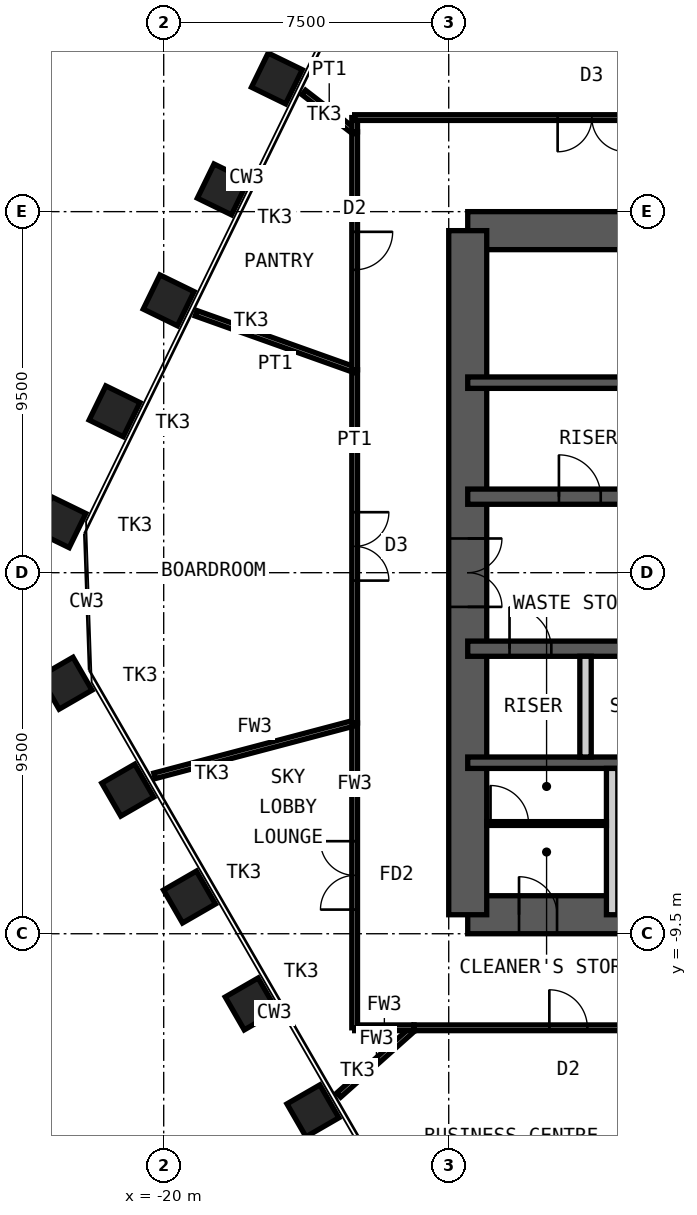
"""IFC4 building model, lengths in metres.
Left out: names, types, materials, properties, quantities, classifications, styles, units other than length and angle.
Written with IfcOpenShell. Run it as: python <this file> out.ifc"""

import sys

from ifc_helpers import new_model, si_unit, direction, frame, frame_2d, origin, origin_2d, place, context, subcontext, project, spatial, rectangle, hollow_rectangle, extrude, element, fill, save


model = new_model("IFC4")
c1 = context("Model", 3, precision=1e-05, world=origin(), true_north=direction((0.0, 1.0)))
c2 = subcontext(c1, "Body", "Model", "MODEL_VIEW")
j1 = project(units=[si_unit("LENGTHUNIT", "METRE"), si_unit("PLANEANGLEUNIT", "RADIAN")], contexts=[c1])
p1 = place(None, origin())
s1 = spatial("IfcSite", under=j1, at=p1, CompositionType="ELEMENT")
p2 = place(p1, origin())
s2 = spatial("IfcBuilding", under=s1, at=p2, CompositionType="ELEMENT")
p3 = place(p2, frame((0.0, 0.0, 262.0)))
s3 = spatial("IfcBuildingStorey", under=s2, at=p3, CompositionType="ELEMENT", Elevation=262.0)
for number, where, z_axis, x_axis in (
    (1, (-16.073, -14.16, 0.0), (0.0, 0.0, 1.0), (0.5, -0.866, 0.0)),
    (2, (-17.698, -11.347, 0.0), (0.0, 0.0, 1.0), (0.5, -0.866, 0.0)),
    (3, (-19.322, -8.534, 0.0), (0.0, 0.0, 1.0), (0.5, -0.866, 0.0)),
    (4, (-20.946, -5.721, 0.0), (0.0, 0.0, 1.0), (0.5, -0.866, 0.0)),
    (5, (-22.57, -2.908, 0.0), (0.0, 0.0, 1.0), (0.5, -0.866, 0.0)),
    (6, (-22.717, 1.327, 0.0), (0.0, 0.0, 1.0), (-0.438, -0.899, 0.0)),
    (7, (-21.293, 4.246, 0.0), (0.0, 0.0, 1.0), (-0.438, -0.899, 0.0)),
    (8, (-19.87, 7.166, 0.0), (0.0, 0.0, 1.0), (-0.438, -0.899, 0.0)),
    (9, (-18.446, 10.085, 0.0), (0.0, 0.0, 1.0), (-0.438, -0.899, 0.0)),
    (10, (-17.022, 13.004, 0.0), (0.0, 0.0, 1.0), (-0.438, -0.899, 0.0)),
):
    element("IfcColumn", number, at=place(p3, frame(where, z_axis=z_axis, x_axis=x_axis)), inside=s3, PredefinedType="COLUMN", context=c2, shape_type="SweptSolid", body=[
        extrude(hollow_rectangle(XDim=1.0, YDim=1.0, WallThickness=0.08, at=origin_2d()), origin(), (0.0, 0.0, 1.0), 4.2),
    ])
p4 = place(p3, frame((-12.0, 9.0, 0.0), z_axis=(0.0, 0.0, 1.0), x_axis=(1.0, 0.0, 0.0)))
e11 = element("IfcWall", 11, at=p4, inside=s3, PredefinedType="SHEAR", context=c2, shape_type="SweptSolid", body=[
    extrude(rectangle(XDim=24.0, YDim=1.0, at=frame_2d((12.0, 0.0))), origin(), (0.0, 0.0, 1.0), 4.2),
])
p5 = place(p4, frame((10.4, 0.0, 0.0)))
e12 = element("IfcOpeningElement", 12, at=p5, cuts=e11, PredefinedType="OPENING", context=c2, shape_type="SweptSolid", body=[
    extrude(rectangle(XDim=1.0, YDim=2.1, at=frame_2d((0.5, 1.05))), frame((0.0, 0.51, 0.0), z_axis=(0.0, -1.0, 0.0), x_axis=(1.0, 0.0, 0.0)), (0.0, 0.0, 1.0), 1.02),
])
p6 = place(p4, frame((17.6, 0.0, 0.0)))
e13 = element("IfcOpeningElement", 13, at=p6, cuts=e11, PredefinedType="OPENING", context=c2, shape_type="SweptSolid", body=[
    extrude(rectangle(XDim=0.9, YDim=2.1, at=frame_2d((0.45, 1.05))), frame((0.0, 0.51, 0.0), z_axis=(0.0, -1.0, 0.0), x_axis=(1.0, 0.0, 0.0)), (0.0, 0.0, 1.0), 1.02),
])
p7 = place(p4, frame((21.9, 0.0, 0.0)))
e14 = element("IfcOpeningElement", 14, at=p7, cuts=e11, PredefinedType="OPENING", context=c2, shape_type="SweptSolid", body=[
    extrude(rectangle(XDim=0.9, YDim=2.1, at=frame_2d((0.45, 1.05))), frame((0.0, 0.51, 0.0), z_axis=(0.0, -1.0, 0.0), x_axis=(1.0, 0.0, 0.0)), (0.0, 0.0, 1.0), 1.02),
])
p8 = place(p3, frame((-12.0, -9.0, 0.0), z_axis=(0.0, 0.0, 1.0), x_axis=(1.0, 0.0, 0.0)))
e15 = element("IfcWall", 15, at=p8, inside=s3, PredefinedType="SHEAR", context=c2, shape_type="SweptSolid", body=[
    extrude(rectangle(XDim=24.0, YDim=1.0, at=frame_2d((12.0, 0.0))), origin(), (0.0, 0.0, 1.0), 4.2),
])
p9 = place(p8, frame((1.35, 0.0, 0.0)))
e16 = element("IfcOpeningElement", 16, at=p9, cuts=e15, PredefinedType="OPENING", context=c2, shape_type="SweptSolid", body=[
    extrude(rectangle(XDim=1.0, YDim=2.1, at=frame_2d((0.5, 1.05))), frame((0.0, 0.51, 0.0), z_axis=(0.0, -1.0, 0.0), x_axis=(1.0, 0.0, 0.0)), (0.0, 0.0, 1.0), 1.02),
])
p10 = place(p8, frame((5.325, 0.0, 0.0)))
e17 = element("IfcOpeningElement", 17, at=p10, cuts=e15, PredefinedType="OPENING", context=c2, shape_type="SweptSolid", body=[
    extrude(rectangle(XDim=1.15, YDim=2.1, at=frame_2d((0.575, 1.05))), frame((0.0, 0.51, 0.0), z_axis=(0.0, -1.0, 0.0), x_axis=(1.0, 0.0, 0.0)), (0.0, 0.0, 1.0), 1.02),
])
p11 = place(p8, frame((12.6, 0.0, 0.0)))
e18 = element("IfcOpeningElement", 18, at=p11, cuts=e15, PredefinedType="OPENING", context=c2, shape_type="SweptSolid", body=[
    extrude(rectangle(XDim=1.0, YDim=2.1, at=frame_2d((0.5, 1.05))), frame((0.0, 0.51, 0.0), z_axis=(0.0, -1.0, 0.0), x_axis=(1.0, 0.0, 0.0)), (0.0, 0.0, 1.0), 1.02),
])
p12 = place(p3, frame((-12.0, -9.0, 0.0), z_axis=(0.0, 0.0, 1.0), x_axis=(0.0, 1.0, 0.0)))
e19 = element("IfcWall", 19, at=p12, inside=s3, PredefinedType="SHEAR", context=c2, shape_type="SweptSolid", body=[
    extrude(rectangle(XDim=18.0, YDim=1.0, at=frame_2d((9.0, 0.0))), origin(), (0.0, 0.0, 1.0), 4.2),
])
p13 = place(p12, frame((8.1, 0.0, 0.0)))
e20 = element("IfcOpeningElement", 20, at=p13, cuts=e19, PredefinedType="OPENING", context=c2, shape_type="SweptSolid", body=[
    extrude(rectangle(XDim=1.8, YDim=2.1, at=frame_2d((0.9, 1.05))), frame((0.0, 0.51, 0.0), z_axis=(0.0, -1.0, 0.0), x_axis=(1.0, 0.0, 0.0)), (0.0, 0.0, 1.0), 1.02),
])
p14 = place(p3, frame((-12.0, 5.0, 0.0), z_axis=(0.0, 0.0, 1.0), x_axis=(1.0, 0.0, 0.0)))
e21 = element("IfcWall", 21, at=p14, inside=s3, PredefinedType="SHEAR", context=c2, shape_type="SweptSolid", body=[
    extrude(rectangle(XDim=24.0, YDim=0.3, at=frame_2d((12.0, 0.0))), origin(), (0.0, 0.0, 1.0), 4.2),
])
p15 = place(p3, frame((-12.0, 2.0, 0.0), z_axis=(0.0, 0.0, 1.0), x_axis=(1.0, 0.0, 0.0)))
e22 = element("IfcWall", 22, at=p15, inside=s3, PredefinedType="SHEAR", context=c2, shape_type="SweptSolid", body=[
    extrude(rectangle(XDim=24.0, YDim=0.4, at=frame_2d((12.0, 0.0))), origin(), (0.0, 0.0, 1.0), 4.2),
])
p16 = place(p15, frame((2.4, 0.0, 0.0)))
e23 = element("IfcOpeningElement", 23, at=p16, cuts=e22, PredefinedType="OPENING", context=c2, shape_type="SweptSolid", body=[
    extrude(rectangle(XDim=1.1, YDim=2.1, at=frame_2d((0.55, 1.05))), frame((0.0, 0.21, 0.0), z_axis=(0.0, -1.0, 0.0), x_axis=(1.0, 0.0, 0.0)), (0.0, 0.0, 1.0), 0.42),
])
p17 = place(p15, frame((22.0, 0.0, 0.0)))
e24 = element("IfcOpeningElement", 24, at=p17, cuts=e22, PredefinedType="OPENING", context=c2, shape_type="SweptSolid", body=[
    extrude(rectangle(XDim=1.1, YDim=2.1, at=frame_2d((0.55, 1.05))), frame((0.0, 0.21, 0.0), z_axis=(0.0, -1.0, 0.0), x_axis=(1.0, 0.0, 0.0)), (0.0, 0.0, 1.0), 0.42),
])
p18 = place(p15, frame((10.15, 0.0, 0.0)))
e25 = element("IfcOpeningElement", 25, at=p18, cuts=e22, PredefinedType="OPENING", context=c2, shape_type="SweptSolid", body=[
    extrude(rectangle(XDim=1.0, YDim=2.1, at=frame_2d((0.5, 1.05))), frame((0.0, 0.21, 0.0), z_axis=(0.0, -1.0, 0.0), x_axis=(1.0, 0.0, 0.0)), (0.0, 0.0, 1.0), 0.42),
])
p19 = place(p15, frame((6.9, 0.0, 0.0)))
e26 = element("IfcOpeningElement", 26, at=p19, cuts=e22, PredefinedType="OPENING", context=c2, shape_type="SweptSolid", body=[
    extrude(rectangle(XDim=1.0, YDim=2.1, at=frame_2d((0.5, 1.05))), frame((0.0, 0.21, 0.0), z_axis=(0.0, -1.0, 0.0), x_axis=(1.0, 0.0, 0.0)), (0.0, 0.0, 1.0), 0.42),
])
p20 = place(p15, frame((13.35, 0.0, 0.0)))
e27 = element("IfcOpeningElement", 27, at=p20, cuts=e22, PredefinedType="OPENING", context=c2, shape_type="SweptSolid", body=[
    extrude(rectangle(XDim=1.1, YDim=2.4, at=frame_2d((0.55, 1.2))), frame((0.0, 0.21, 0.0), z_axis=(0.0, -1.0, 0.0), x_axis=(1.0, 0.0, 0.0)), (0.0, 0.0, 1.0), 0.42),
])
p21 = place(p15, frame((16.15, 0.0, 0.0)))
e28 = element("IfcOpeningElement", 28, at=p21, cuts=e22, PredefinedType="OPENING", context=c2, shape_type="SweptSolid", body=[
    extrude(rectangle(XDim=1.1, YDim=2.4, at=frame_2d((0.55, 1.2))), frame((0.0, 0.21, 0.0), z_axis=(0.0, -1.0, 0.0), x_axis=(1.0, 0.0, 0.0)), (0.0, 0.0, 1.0), 0.42),
])
p22 = place(p15, frame((19.0, 0.0, 0.0)))
e29 = element("IfcOpeningElement", 29, at=p22, cuts=e22, PredefinedType="OPENING", context=c2, shape_type="SweptSolid", body=[
    extrude(rectangle(XDim=1.0, YDim=2.1, at=frame_2d((0.5, 1.05))), frame((0.0, 0.21, 0.0), z_axis=(0.0, -1.0, 0.0), x_axis=(1.0, 0.0, 0.0)), (0.0, 0.0, 1.0), 0.42),
])
p23 = place(p3, frame((-12.0, -2.0, 0.0), z_axis=(0.0, 0.0, 1.0), x_axis=(1.0, 0.0, 0.0)))
e30 = element("IfcWall", 30, at=p23, inside=s3, PredefinedType="SHEAR", context=c2, shape_type="SweptSolid", body=[
    extrude(rectangle(XDim=24.0, YDim=0.4, at=frame_2d((12.0, 0.0))), origin(), (0.0, 0.0, 1.0), 4.2),
])
p24 = place(p23, frame((1.1, 0.0, 0.0)))
e31 = element("IfcOpeningElement", 31, at=p24, cuts=e30, PredefinedType="OPENING", context=c2, shape_type="SweptSolid", body=[
    extrude(rectangle(XDim=1.1, YDim=2.1, at=frame_2d((0.55, 1.05))), frame((0.0, 0.21, 0.0), z_axis=(0.0, -1.0, 0.0), x_axis=(1.0, 0.0, 0.0)), (0.0, 0.0, 1.0), 0.42),
])
p25 = place(p23, frame((13.55, 0.0, 0.0)))
e32 = element("IfcOpeningElement", 32, at=p25, cuts=e30, PredefinedType="OPENING", context=c2, shape_type="SweptSolid", body=[
    extrude(rectangle(XDim=1.1, YDim=2.1, at=frame_2d((0.55, 1.05))), frame((0.0, 0.21, 0.0), z_axis=(0.0, -1.0, 0.0), x_axis=(1.0, 0.0, 0.0)), (0.0, 0.0, 1.0), 0.42),
])
p26 = place(p23, frame((20.7, 0.0, 0.0)))
e33 = element("IfcOpeningElement", 33, at=p26, cuts=e30, PredefinedType="OPENING", context=c2, shape_type="SweptSolid", body=[
    extrude(rectangle(XDim=1.1, YDim=2.1, at=frame_2d((0.55, 1.05))), frame((0.0, 0.21, 0.0), z_axis=(0.0, -1.0, 0.0), x_axis=(1.0, 0.0, 0.0)), (0.0, 0.0, 1.0), 0.42),
])
p27 = place(p23, frame((4.0, 0.0, 0.0)))
e34 = element("IfcOpeningElement", 34, at=p27, cuts=e30, PredefinedType="OPENING", context=c2, shape_type="SweptSolid", body=[
    extrude(rectangle(XDim=1.0, YDim=2.1, at=frame_2d((0.5, 1.05))), frame((0.0, 0.21, 0.0), z_axis=(0.0, -1.0, 0.0), x_axis=(1.0, 0.0, 0.0)), (0.0, 0.0, 1.0), 0.42),
])
p28 = place(p23, frame((6.8, 0.0, 0.0)))
e35 = element("IfcOpeningElement", 35, at=p28, cuts=e30, PredefinedType="OPENING", context=c2, shape_type="SweptSolid", body=[
    extrude(rectangle(XDim=1.0, YDim=2.1, at=frame_2d((0.5, 1.05))), frame((0.0, 0.21, 0.0), z_axis=(0.0, -1.0, 0.0), x_axis=(1.0, 0.0, 0.0)), (0.0, 0.0, 1.0), 0.42),
])
p29 = place(p23, frame((9.55, 0.0, 0.0)))
e36 = element("IfcOpeningElement", 36, at=p29, cuts=e30, PredefinedType="OPENING", context=c2, shape_type="SweptSolid", body=[
    extrude(rectangle(XDim=1.1, YDim=2.4, at=frame_2d((0.55, 1.2))), frame((0.0, 0.21, 0.0), z_axis=(0.0, -1.0, 0.0), x_axis=(1.0, 0.0, 0.0)), (0.0, 0.0, 1.0), 0.42),
])
p30 = place(p3, frame((-12.0, -5.0, 0.0), z_axis=(0.0, 0.0, 1.0), x_axis=(1.0, 0.0, 0.0)))
e37 = element("IfcWall", 37, at=p30, inside=s3, PredefinedType="SHEAR", context=c2, shape_type="SweptSolid", body=[
    extrude(rectangle(XDim=24.0, YDim=0.3, at=frame_2d((12.0, 0.0))), origin(), (0.0, 0.0, 1.0), 4.2),
])
p31 = place(p3, frame((-8.9, -4.85, 0.0), z_axis=(0.0, 0.0, 1.0), x_axis=(0.0, 1.0, 0.0)))
e38 = element("IfcWall", 38, at=p31, inside=s3, PredefinedType="PARTITIONING", context=c2, shape_type="SweptSolid", body=[
    extrude(rectangle(XDim=2.65, YDim=0.3, at=frame_2d((1.325, 0.0))), origin(), (0.0, 0.0, 1.0), 3.98),
])
p32 = place(p3, frame((-8.2, -9.0, 0.0), z_axis=(0.0, 0.0, 1.0), x_axis=(0.0, 1.0, 0.0)))
e39 = element("IfcWall", 39, at=p32, inside=s3, PredefinedType="PARTITIONING", context=c2, shape_type="SweptSolid", body=[
    extrude(rectangle(XDim=3.85, YDim=0.3, at=frame_2d((1.925, 0.0))), origin(), (0.0, 0.0, 1.0), 3.98),
])
p33 = place(p3, frame((-11.5, -6.6, 0.0), z_axis=(0.0, 0.0, 1.0), x_axis=(1.0, 0.0, 0.0)))
e40 = element("IfcWall", 40, at=p33, inside=s3, PredefinedType="PARTITIONING", context=c2, shape_type="SweptSolid", body=[
    extrude(rectangle(XDim=3.15, YDim=0.1, at=frame_2d((1.575, 0.0))), origin(), (0.0, 0.0, 1.0), 3.98),
])
p34 = place(p33, frame((0.1, 0.0, 0.0)))
e41 = element("IfcOpeningElement", 41, at=p34, cuts=e40, PredefinedType="OPENING", context=c2, shape_type="SweptSolid", body=[
    extrude(rectangle(XDim=1.0, YDim=2.4, at=frame_2d((0.5, 1.2))), frame((0.0, 0.06, 0.0), z_axis=(0.0, -1.0, 0.0), x_axis=(1.0, 0.0, 0.0)), (0.0, 0.0, 1.0), 0.12),
])
p35 = place(p3, frame((-15.393, -13.743, 0.0), z_axis=(0.0, 0.0, 1.0), x_axis=(0.745931135399, 0.666023078611, 0.0)))
e42 = element("IfcWall", 42, at=p35, inside=s3, PredefinedType="PARTITIONING", context=c2, shape_type="SweptSolid", body=[
    extrude(rectangle(XDim=2.655, YDim=0.15, at=frame_2d((1.328, 0.0))), origin(), (0.0, 0.0, 1.0), 2.93),
])
p36 = place(p3, frame((-13.412, -11.975, 0.0), z_axis=(0.0, 0.0, 1.0), x_axis=(-1.0, 0.0, 0.0)))
e43 = element("IfcWall", 43, at=p36, inside=s3, PredefinedType="PARTITIONING", context=c2, shape_type="SweptSolid", body=[
    extrude(rectangle(XDim=1.563, YDim=0.15, at=frame_2d((0.781, 0.0))), origin(), (0.0, 0.0, 1.0), 4.03),
])
p37 = place(p3, frame((-14.975, -11.975, 0.0), z_axis=(0.0, 0.0, 1.0), x_axis=(0.0, 1.0, 0.0)))
e44 = element("IfcWall", 44, at=p37, inside=s3, PredefinedType="PARTITIONING", context=c2, shape_type="SweptSolid", body=[
    extrude(rectangle(XDim=8.02, YDim=0.15, at=frame_2d((4.01, 0.0))), origin(), (0.0, 0.0, 1.0), 4.03),
])
p38 = place(p37, frame((3.11, 0.0, 0.0)))
e45 = element("IfcOpeningElement", 45, at=p38, cuts=e44, PredefinedType="OPENING", context=c2, shape_type="SweptSolid", body=[
    extrude(rectangle(XDim=1.8, YDim=2.1, at=frame_2d((0.9, 1.05))), frame((0.0, 0.085, 0.0), z_axis=(0.0, -1.0, 0.0), x_axis=(1.0, 0.0, 0.0)), (0.0, 0.0, 1.0), 0.17),
])
p39 = place(p3, frame((-20.243, -5.346, 0.0), z_axis=(0.0, 0.0, 1.0), x_axis=(0.966852434645, 0.255335797766, 0.0)))
e46 = element("IfcWall", 46, at=p39, inside=s3, PredefinedType="PARTITIONING", context=c2, shape_type="SweptSolid", body=[
    extrude(rectangle(XDim=5.448, YDim=0.15, at=frame_2d((2.724, 0.0))), origin(), (0.0, 0.0, 1.0), 2.93),
])
p40 = place(p3, frame((-14.975, -3.955, 0.0), z_axis=(0.0, 0.0, 1.0), x_axis=(0.0, 1.0, 0.0)))
e47 = element("IfcWall", 47, at=p40, inside=s3, PredefinedType="PARTITIONING", context=c2, shape_type="SweptSolid", body=[
    extrude(rectangle(XDim=9.293, YDim=0.15, at=frame_2d((4.646, 0.0))), origin(), (0.0, 0.0, 1.0), 4.03),
])
p41 = place(p40, frame((3.747, 0.0, 0.0)))
e48 = element("IfcOpeningElement", 48, at=p41, cuts=e47, PredefinedType="OPENING", context=c2, shape_type="SweptSolid", body=[
    extrude(rectangle(XDim=1.8, YDim=2.4, at=frame_2d((0.9, 1.2))), frame((0.0, 0.085, 0.0), z_axis=(0.0, -1.0, 0.0), x_axis=(1.0, 0.0, 0.0)), (0.0, 0.0, 1.0), 0.17),
])
p42 = place(p3, frame((-19.146, 6.825, 0.0), z_axis=(0.0, 0.0, 1.0), x_axis=(0.941930110788, -0.335808973065, 0.0)))
e49 = element("IfcWall", 49, at=p42, inside=s3, PredefinedType="PARTITIONING", context=c2, shape_type="SweptSolid", body=[
    extrude(rectangle(XDim=4.428, YDim=0.15, at=frame_2d((2.214, 0.0))), origin(), (0.0, 0.0, 1.0), 2.93),
])
p43 = place(p3, frame((-14.975, 5.338, 0.0), z_axis=(0.0, 0.0, 1.0), x_axis=(0.0, 1.0, 0.0)))
e50 = element("IfcWall", 50, at=p43, inside=s3, PredefinedType="PARTITIONING", context=c2, shape_type="SweptSolid", body=[
    extrude(rectangle(XDim=6.261, YDim=0.15, at=frame_2d((3.13, 0.0))), origin(), (0.0, 0.0, 1.0), 4.03),
])
p44 = place(p43, frame((2.63, 0.0, 0.0)))
e51 = element("IfcOpeningElement", 51, at=p44, cuts=e50, PredefinedType="OPENING", context=c2, shape_type="SweptSolid", body=[
    extrude(rectangle(XDim=1.0, YDim=2.4, at=frame_2d((0.5, 1.2))), frame((0.0, 0.085, 0.0), z_axis=(0.0, -1.0, 0.0), x_axis=(1.0, 0.0, 0.0)), (0.0, 0.0, 1.0), 0.17),
])
p45 = place(p3, frame((-16.314, 12.636, 0.0), z_axis=(0.0, 0.0, 1.0), x_axis=(0.790507537632, -0.612452310753, 0.0)))
e52 = element("IfcWall", 52, at=p45, inside=s3, PredefinedType="PARTITIONING", context=c2, shape_type="SweptSolid", body=[
    extrude(rectangle(XDim=1.693, YDim=0.15, at=frame_2d((0.847, 0.0))), origin(), (0.0, 0.0, 1.0), 2.93),
])
p46 = place(p3, frame((-14.975, 11.599, 0.0), z_axis=(0.0, 0.0, 1.0), x_axis=(0.0, 1.0, 0.0)))
e53 = element("IfcWall", 53, at=p46, inside=s3, PredefinedType="PARTITIONING", context=c2, shape_type="SweptSolid", body=[
    extrude(rectangle(XDim=0.376, YDim=0.15, at=frame_2d((0.188, 0.0))), origin(), (0.0, 0.0, 1.0), 4.03),
])
p47 = place(p3, frame((-14.975, 11.975, 0.0), z_axis=(0.0, 0.0, 1.0), x_axis=(1.0, 0.0, 0.0)))
e54 = element("IfcWall", 54, at=p47, inside=s3, PredefinedType="PARTITIONING", context=c2, shape_type="SweptSolid", body=[
    extrude(rectangle(XDim=12.482, YDim=0.15, at=frame_2d((6.241, 0.0))), origin(), (0.0, 0.0, 1.0), 4.03),
])
p48 = place(p47, frame((5.341, 0.0, 0.0)))
e55 = element("IfcOpeningElement", 55, at=p48, cuts=e54, PredefinedType="OPENING", context=c2, shape_type="SweptSolid", body=[
    extrude(rectangle(XDim=1.8, YDim=2.4, at=frame_2d((0.9, 1.2))), frame((0.0, 0.085, 0.0), z_axis=(0.0, -1.0, 0.0), x_axis=(1.0, 0.0, 0.0)), (0.0, 0.0, 1.0), 0.17),
])
p49 = place(p3, frame((-9.24, -20.907, 0.0), z_axis=(0.0, 0.0, 1.0), x_axis=(0.404237785991, 0.91465393039, 0.0)))
e56 = element("IfcWall", 56, at=p49, inside=s3, PredefinedType="PARTITIONING", context=c2, shape_type="SweptSolid", body=[
    extrude(rectangle(XDim=9.765, YDim=0.15, at=frame_2d((4.883, 0.0))), origin(), (0.0, 0.0, 1.0), 3.03),
])
p50 = place(p3, frame((-5.292, -11.975, 0.0), z_axis=(0.0, 0.0, 1.0), x_axis=(-1.0, 0.0, 0.0)))
e57 = element("IfcWall", 57, at=p50, inside=s3, PredefinedType="PARTITIONING", context=c2, shape_type="SweptSolid", body=[
    extrude(rectangle(XDim=8.12, YDim=0.15, at=frame_2d((4.06, 0.0))), origin(), (0.0, 0.0, 1.0), 4.03),
])
p51 = place(p50, frame((3.56, 0.0, 0.0)))
e58 = element("IfcOpeningElement", 58, at=p51, cuts=e57, PredefinedType="OPENING", context=c2, shape_type="SweptSolid", body=[
    extrude(rectangle(XDim=1.0, YDim=2.4, at=frame_2d((0.5, 1.2))), frame((0.0, 0.085, 0.0), z_axis=(0.0, -1.0, 0.0), x_axis=(1.0, 0.0, 0.0)), (0.0, 0.0, 1.0), 0.17),
])
p52 = place(p9, origin())
e59 = element("IfcDoor", 59, at=p52, inside=s3, OperationType="SINGLE_SWING_RIGHT", PredefinedType="DOOR", context=c2, shape_type="SweptSolid", body=[
    extrude(rectangle(XDim=1.0, YDim=2.1, at=frame_2d((0.5, 1.05))), frame((0.0, 0.025, 0.0), z_axis=(0.0, -1.0, 0.0), x_axis=(1.0, 0.0, 0.0)), (0.0, 0.0, 1.0), 0.05),
])
fill(e16, e59)
p53 = place(p16, origin())
e60 = element("IfcDoor", 60, at=p53, inside=s3, OperationType="SINGLE_SWING_RIGHT", PredefinedType="DOOR", context=c2, shape_type="SweptSolid", body=[
    extrude(rectangle(XDim=1.1, YDim=2.1, at=frame_2d((0.55, 1.05))), frame((0.0, 0.025, 0.0), z_axis=(0.0, -1.0, 0.0), x_axis=(1.0, 0.0, 0.0)), (0.0, 0.0, 1.0), 0.05),
])
fill(e23, e60)
p54 = place(p24, origin())
e61 = element("IfcDoor", 61, at=p54, inside=s3, OperationType="SINGLE_SWING_RIGHT", PredefinedType="DOOR", context=c2, shape_type="SweptSolid", body=[
    extrude(rectangle(XDim=1.1, YDim=2.1, at=frame_2d((0.55, 1.05))), frame((0.0, 0.025, 0.0), z_axis=(0.0, -1.0, 0.0), x_axis=(1.0, 0.0, 0.0)), (0.0, 0.0, 1.0), 0.05),
])
fill(e31, e61)
p55 = place(p13, origin())
e62 = element("IfcDoor", 62, at=p55, inside=s3, OperationType="DOUBLE_DOOR_DOUBLE_SWING", PredefinedType="DOOR", context=c2, shape_type="SweptSolid", body=[
    extrude(rectangle(XDim=1.8, YDim=2.1, at=frame_2d((0.9, 1.05))), frame((0.0, 0.025, 0.0), z_axis=(0.0, -1.0, 0.0), x_axis=(1.0, 0.0, 0.0)), (0.0, 0.0, 1.0), 0.05),
])
fill(e20, e62)
p56 = place(p34, origin())
e63 = element("IfcDoor", 63, at=p56, inside=s3, OperationType="SINGLE_SWING_RIGHT", PredefinedType="DOOR", context=c2, shape_type="SweptSolid", body=[
    extrude(rectangle(XDim=1.0, YDim=2.4, at=frame_2d((0.5, 1.2))), frame((0.0, 0.025, 0.0), z_axis=(0.0, -1.0, 0.0), x_axis=(1.0, 0.0, 0.0)), (0.0, 0.0, 1.0), 0.05),
])
fill(e41, e63)
p57 = place(p38, origin())
e64 = element("IfcDoor", 64, at=p57, inside=s3, OperationType="DOUBLE_DOOR_DOUBLE_SWING", PredefinedType="DOOR", context=c2, shape_type="SweptSolid", body=[
    extrude(rectangle(XDim=1.8, YDim=2.1, at=frame_2d((0.9, 1.05))), frame((0.0, 0.025, 0.0), z_axis=(0.0, -1.0, 0.0), x_axis=(1.0, 0.0, 0.0)), (0.0, 0.0, 1.0), 0.05),
])
fill(e45, e64)
p58 = place(p41, origin())
e65 = element("IfcDoor", 65, at=p58, inside=s3, OperationType="DOUBLE_DOOR_DOUBLE_SWING", PredefinedType="DOOR", context=c2, shape_type="SweptSolid", body=[
    extrude(rectangle(XDim=1.8, YDim=2.4, at=frame_2d((0.9, 1.2))), frame((0.0, 0.025, 0.0), z_axis=(0.0, -1.0, 0.0), x_axis=(1.0, 0.0, 0.0)), (0.0, 0.0, 1.0), 0.05),
])
fill(e48, e65)
p59 = place(p44, origin())
e66 = element("IfcDoor", 66, at=p59, inside=s3, OperationType="SINGLE_SWING_RIGHT", PredefinedType="DOOR", context=c2, shape_type="SweptSolid", body=[
    extrude(rectangle(XDim=1.0, YDim=2.4, at=frame_2d((0.5, 1.2))), frame((0.0, 0.025, 0.0), z_axis=(0.0, -1.0, 0.0), x_axis=(1.0, 0.0, 0.0)), (0.0, 0.0, 1.0), 0.05),
])
fill(e51, e66)
p60 = place(p48, origin())
e67 = element("IfcDoor", 67, at=p60, inside=s3, OperationType="DOUBLE_DOOR_DOUBLE_SWING", PredefinedType="DOOR", context=c2, shape_type="SweptSolid", body=[
    extrude(rectangle(XDim=1.8, YDim=2.4, at=frame_2d((0.9, 1.2))), frame((0.0, 0.025, 0.0), z_axis=(0.0, -1.0, 0.0), x_axis=(1.0, 0.0, 0.0)), (0.0, 0.0, 1.0), 0.05),
])
fill(e55, e67)
p61 = place(p51, origin())
e68 = element("IfcDoor", 68, at=p61, inside=s3, OperationType="SINGLE_SWING_RIGHT", PredefinedType="DOOR", context=c2, shape_type="SweptSolid", body=[
    extrude(rectangle(XDim=1.0, YDim=2.4, at=frame_2d((0.5, 1.2))), frame((0.0, 0.025, 0.0), z_axis=(0.0, -1.0, 0.0), x_axis=(1.0, 0.0, 0.0)), (0.0, 0.0, 1.0), 0.05),
])
fill(e58, e68)
save(model, sys.argv[1])
